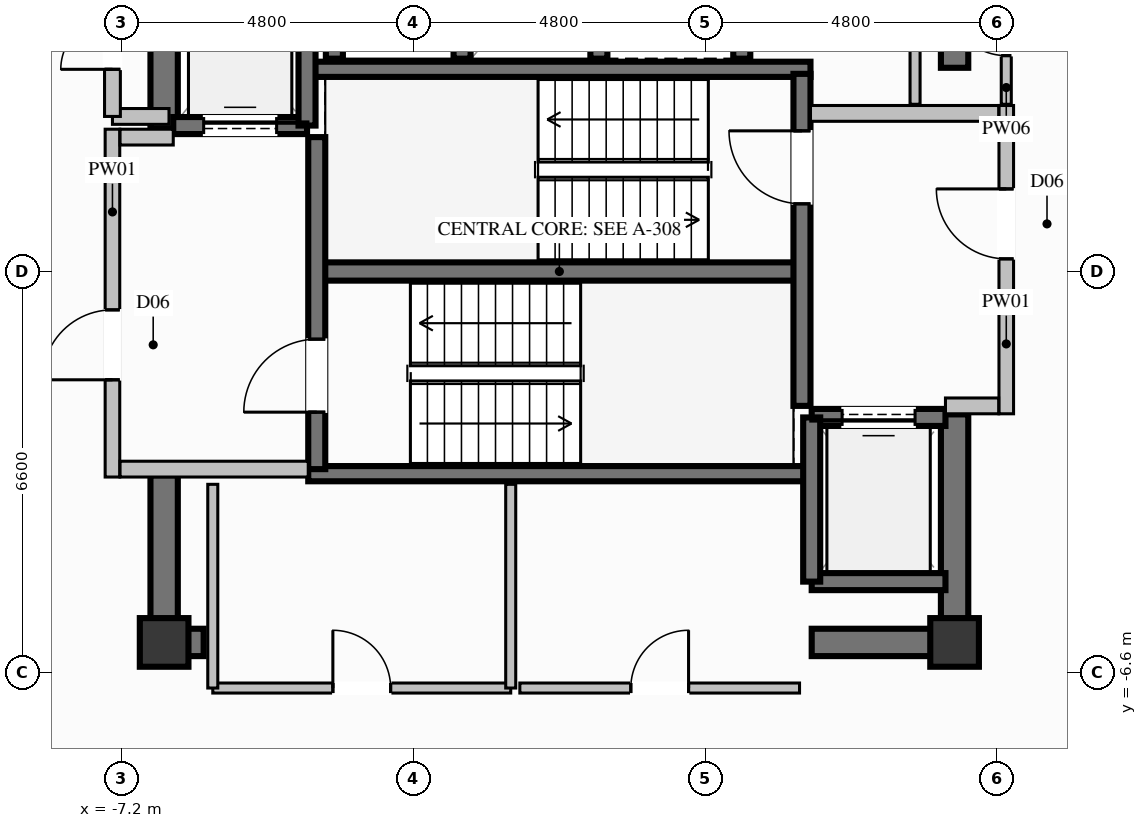
"""IFC4 building model, lengths in metres.
Left out: names, types, materials, properties, quantities, classifications, styles, units other than length and angle.
Written with IfcOpenShell. Run it as: python <this file> out.ifc"""

import sys

from ifc_helpers import new_model, si_unit, direction, frame, frame_2d, origin, origin_2d, place, context, subcontext, project, spatial, rectangle, extrude, element, fill, save


model = new_model("IFC4")
c1 = context("Model", 3, precision=1e-05, world=origin(), true_north=direction((0.0, 1.0)))
c2 = subcontext(c1, "Body", "Model", "MODEL_VIEW")
j1 = project(units=[si_unit("LENGTHUNIT", "METRE"), si_unit("PLANEANGLEUNIT", "RADIAN")], contexts=[c1])
p1 = place(None, origin())
s1 = spatial("IfcSite", under=j1, at=p1, CompositionType="ELEMENT")
p2 = place(p1, origin())
s2 = spatial("IfcBuilding", under=s1, at=p2, CompositionType="ELEMENT")
p3 = place(p2, frame((0.0, 0.0, 285.8)))
s3 = spatial("IfcBuildingStorey", under=s2, at=p3, CompositionType="ELEMENT", Elevation=285.8)
for number, where, z_axis, x_axis in (
    (1, (-6.5, -6.1, 0.0), (0.0, 0.0, 1.0), (1.0, 0.0, 0.0)),
    (2, (6.5, -6.1, 0.0), (0.0, 0.0, 1.0), (1.0, 0.0, 0.0)),
):
    element("IfcColumn", number, at=place(p3, frame(where, z_axis=z_axis, x_axis=x_axis)), inside=s3, PredefinedType="COLUMN", context=c2, shape_type="SweptSolid", body=[
        extrude(rectangle(XDim=0.8, YDim=0.8, at=origin_2d()), origin(), (0.0, 0.0, 1.0), 3.8),
    ])
p4 = place(p3, frame((-3.99, 0.0, 0.0), z_axis=(0.0, 0.0, 1.0), x_axis=(1.0, 0.0, 0.0)))
e3 = element("IfcWall", 3, at=p4, inside=s3, PredefinedType="SHEAR", context=c2, shape_type="SweptSolid", body=[
    extrude(rectangle(XDim=7.98, YDim=0.3, at=frame_2d((3.99, 0.0))), origin(), (0.0, 0.0, 1.0), 3.8),
])
for number, where, z_axis, x_axis in (
    (4, (-4.13, -3.325, 0.0), (0.0, 0.0, 1.0), (1.0, 0.0, 0.0)),
    (5, (-4.13, 3.325, 0.0), (0.0, 0.0, 1.0), (1.0, 0.0, 0.0)),
):
    element("IfcWall", number, at=place(p3, frame(where, z_axis=z_axis, x_axis=x_axis)), inside=s3, PredefinedType="SOLIDWALL", context=c2, shape_type="SweptSolid", body=[
        extrude(rectangle(XDim=8.26, YDim=0.25, at=frame_2d((4.13, 0.0))), origin(), (0.0, 0.0, 1.0), 3.8),
    ])
p5 = place(p3, frame((-6.275, -6.1, 0.0), z_axis=(0.0, 0.0, 1.0), x_axis=(1.0, 0.0, 0.0)))
e6 = element("IfcWall", 6, at=p5, inside=s3, PredefinedType="SHEAR", context=c2, shape_type="SweptSolid", body=[
    extrude(rectangle(XDim=0.425, YDim=0.45, at=frame_2d((0.212, 0.0))), origin(), (0.0, 0.0, 1.0), 3.8),
])
p6 = place(p3, frame((4.15, -6.1, 0.0), z_axis=(0.0, 0.0, 1.0), x_axis=(1.0, 0.0, 0.0)))
e7 = element("IfcWall", 7, at=p6, inside=s3, PredefinedType="SHEAR", context=c2, shape_type="SweptSolid", body=[
    extrude(rectangle(XDim=2.125, YDim=0.45, at=frame_2d((1.062, 0.0))), origin(), (0.0, 0.0, 1.0), 3.8),
])
p7 = place(p3, frame((-6.5, 2.35, 0.0), z_axis=(0.0, 0.0, 1.0), x_axis=(0.0, 1.0, 0.0)))
e8 = element("IfcWall", 8, at=p7, inside=s3, PredefinedType="SHEAR", context=c2, shape_type="SweptSolid", body=[
    extrude(rectangle(XDim=3.975, YDim=0.45, at=frame_2d((1.987, 0.0))), origin(), (0.0, 0.0, 1.0), 3.8),
])
p8 = place(p3, frame((-6.5, -6.325, 0.0), z_axis=(0.0, 0.0, 1.0), x_axis=(0.0, 1.0, 0.0)))
e9 = element("IfcWall", 9, at=p8, inside=s3, PredefinedType="SHEAR", context=c2, shape_type="SweptSolid", body=[
    extrude(rectangle(XDim=2.975, YDim=0.45, at=frame_2d((1.487, 0.0))), origin(), (0.0, 0.0, 1.0), 3.8),
])
p9 = place(p3, frame((6.5, -6.325, 0.0), z_axis=(0.0, 0.0, 1.0), x_axis=(0.0, 1.0, 0.0)))
e10 = element("IfcWall", 10, at=p9, inside=s3, PredefinedType="SHEAR", context=c2, shape_type="SweptSolid", body=[
    extrude(rectangle(XDim=3.975, YDim=0.45, at=frame_2d((1.987, 0.0))), origin(), (0.0, 0.0, 1.0), 3.8),
])
p10 = place(p3, frame((6.5, 3.35, 0.0), z_axis=(0.0, 0.0, 1.0), x_axis=(0.0, 1.0, 0.0)))
e11 = element("IfcWall", 11, at=p10, inside=s3, PredefinedType="SHEAR", context=c2, shape_type="SweptSolid", body=[
    extrude(rectangle(XDim=2.975, YDim=0.45, at=frame_2d((1.487, 0.0))), origin(), (0.0, 0.0, 1.0), 3.8),
])
for number, where, z_axis, x_axis in (
    (12, (-3.7, 6.0, 0.0), (0.0, 0.0, 1.0), (0.0, -1.0, 0.0)),
    (13, (-1.6, 3.5, 0.0), (0.0, 0.0, 1.0), (0.0, 1.0, 0.0)),
    (14, (0.65, 3.5, 0.0), (0.0, 0.0, 1.0), (0.0, 1.0, 0.0)),
    (15, (3.0, 3.5, 0.0), (0.0, 0.0, 1.0), (0.0, 1.0, 0.0)),
):
    element("IfcWall", number, at=place(p3, frame(where, z_axis=z_axis, x_axis=x_axis)), inside=s3, PredefinedType="SOLIDWALL", context=c2, shape_type="SweptSolid", body=[
        extrude(rectangle(XDim=2.5, YDim=0.28, at=frame_2d((1.25, 0.0))), origin(), (0.0, 0.0, 1.0), 3.57),
    ])
p11 = place(p3, frame((-6.35, 2.4, 0.0), z_axis=(0.0, 0.0, 1.0), x_axis=(1.0, 0.0, 0.0)))
e16 = element("IfcWall", 16, at=p11, inside=s3, PredefinedType="SOLIDWALL", context=c2, shape_type="SweptSolid", body=[
    extrude(rectangle(XDim=2.2, YDim=0.28, at=frame_2d((1.1, 0.0))), origin(), (0.0, 0.0, 1.0), 3.57),
])
p12 = place(p11, frame((0.5, 0.0, 0.0)))
e17 = element("IfcOpeningElement", 17, at=p12, cuts=e16, PredefinedType="OPENING", context=c2, shape_type="SweptSolid", body=[
    extrude(rectangle(XDim=1.2, YDim=2.2, at=frame_2d((0.6, 1.1))), frame((0.0, 0.15, 0.0), z_axis=(0.0, -1.0, 0.0), x_axis=(1.0, 0.0, 0.0)), (0.0, 0.0, 1.0), 0.3),
])
p13 = place(p3, frame((-4.15, 2.4, 0.0), z_axis=(0.0, 0.0, 1.0), x_axis=(0.0, 1.0, 0.0)))
e18 = element("IfcWall", 18, at=p13, inside=s3, PredefinedType="SOLIDWALL", context=c2, shape_type="SweptSolid", body=[
    extrude(rectangle(XDim=2.7, YDim=0.28, at=frame_2d((1.35, 0.0))), origin(), (0.0, 0.0, 1.0), 3.57),
])
p14 = place(p3, frame((4.15, -5.1, 0.0), z_axis=(0.0, 0.0, 1.0), x_axis=(1.0, 0.0, 0.0)))
e19 = element("IfcWall", 19, at=p14, inside=s3, PredefinedType="SOLIDWALL", context=c2, shape_type="SweptSolid", body=[
    extrude(rectangle(XDim=2.2, YDim=0.28, at=frame_2d((1.1, 0.0))), origin(), (0.0, 0.0, 1.0), 3.57),
])
p15 = place(p3, frame((6.35, -2.4, 0.0), z_axis=(0.0, 0.0, 1.0), x_axis=(-1.0, 0.0, 0.0)))
e20 = element("IfcWall", 20, at=p15, inside=s3, PredefinedType="SOLIDWALL", context=c2, shape_type="SweptSolid", body=[
    extrude(rectangle(XDim=2.2, YDim=0.28, at=frame_2d((1.1, 0.0))), origin(), (0.0, 0.0, 1.0), 3.57),
])
p16 = place(p15, frame((0.5, 0.0, 0.0)))
e21 = element("IfcOpeningElement", 21, at=p16, cuts=e20, PredefinedType="OPENING", context=c2, shape_type="SweptSolid", body=[
    extrude(rectangle(XDim=1.2, YDim=2.2, at=frame_2d((0.6, 1.1))), frame((0.0, 0.15, 0.0), z_axis=(0.0, -1.0, 0.0), x_axis=(1.0, 0.0, 0.0)), (0.0, 0.0, 1.0), 0.3),
])
p17 = place(p3, frame((4.15, -2.4, 0.0), z_axis=(0.0, 0.0, 1.0), x_axis=(0.0, -1.0, 0.0)))
e22 = element("IfcWall", 22, at=p17, inside=s3, PredefinedType="SOLIDWALL", context=c2, shape_type="SweptSolid", body=[
    extrude(rectangle(XDim=2.7, YDim=0.28, at=frame_2d((1.35, 0.0))), origin(), (0.0, 0.0, 1.0), 3.57),
])
p18 = place(p3, frame((-3.99, -3.25, 0.0), z_axis=(0.0, 0.0, 1.0), x_axis=(0.0, 1.0, 0.0)))
e23 = element("IfcWall", 23, at=p18, inside=s3, PredefinedType="SOLIDWALL", context=c2, shape_type="SweptSolid", body=[
    extrude(rectangle(XDim=5.46, YDim=0.28, at=frame_2d((2.73, 0.0))), origin(), (0.0, 0.0, 1.0), 3.57),
])
p19 = place(p18, frame((0.937, 0.0, 0.0)))
e24 = element("IfcOpeningElement", 24, at=p19, cuts=e23, PredefinedType="OPENING", context=c2, shape_type="SweptSolid", body=[
    extrude(rectangle(XDim=1.2, YDim=2.2, at=frame_2d((0.6, 1.1))), frame((0.0, 0.15, 0.0), z_axis=(0.0, -1.0, 0.0), x_axis=(1.0, 0.0, 0.0)), (0.0, 0.0, 1.0), 0.3),
])
p20 = place(p3, frame((3.99, -2.21, 0.0), z_axis=(0.0, 0.0, 1.0), x_axis=(0.0, 1.0, 0.0)))
e25 = element("IfcWall", 25, at=p20, inside=s3, PredefinedType="SOLIDWALL", context=c2, shape_type="SweptSolid", body=[
    extrude(rectangle(XDim=5.46, YDim=0.28, at=frame_2d((2.73, 0.0))), origin(), (0.0, 0.0, 1.0), 3.57),
])
p21 = place(p20, frame((3.323, 0.0, 0.0)))
e26 = element("IfcOpeningElement", 26, at=p21, cuts=e25, PredefinedType="OPENING", context=c2, shape_type="SweptSolid", body=[
    extrude(rectangle(XDim=1.2, YDim=2.2, at=frame_2d((0.6, 1.1))), frame((0.0, 0.15, 0.0), z_axis=(0.0, -1.0, 0.0), x_axis=(1.0, 0.0, 0.0)), (0.0, 0.0, 1.0), 0.3),
])
p22 = place(p3, frame((-7.35, -3.38, 0.0), z_axis=(0.0, 0.0, 1.0), x_axis=(0.0, 1.0, 0.0)))
e27 = element("IfcWall", 27, at=p22, inside=s3, PredefinedType="PARTITIONING", context=c2, shape_type="SweptSolid", body=[
    extrude(rectangle(XDim=5.72, YDim=0.24, at=frame_2d((2.86, 0.0))), origin(), (0.0, 0.0, 1.0), 2.655),
])
p23 = place(p22, frame((1.599, 0.0, 0.0)))
e28 = element("IfcOpeningElement", 28, at=p23, cuts=e27, PredefinedType="OPENING", context=c2, shape_type="SweptSolid", body=[
    extrude(rectangle(XDim=1.15, YDim=2.2, at=frame_2d((0.575, 1.1))), frame((0.0, 0.13, 0.0), z_axis=(0.0, -1.0, 0.0), x_axis=(1.0, 0.0, 0.0)), (0.0, 0.0, 1.0), 0.26),
])
p24 = place(p3, frame((-7.225, -3.25, 0.0), z_axis=(0.0, 0.0, 1.0), x_axis=(1.0, 0.0, 0.0)))
e29 = element("IfcWall", 29, at=p24, inside=s3, PredefinedType="PARTITIONING", context=c2, shape_type="SweptSolid", body=[
    extrude(rectangle(XDim=3.095, YDim=0.26, at=frame_2d((1.548, 0.0))), origin(), (0.0, 0.0, 1.0), 3.57),
])
p25 = place(p3, frame((-7.225, 2.21, 0.0), z_axis=(0.0, 0.0, 1.0), x_axis=(1.0, 0.0, 0.0)))
e30 = element("IfcWall", 30, at=p25, inside=s3, PredefinedType="PARTITIONING", context=c2, shape_type="SweptSolid", body=[
    extrude(rectangle(XDim=0.875, YDim=0.26, at=frame_2d((0.438, 0.0))), origin(), (0.0, 0.0, 1.0), 3.57),
])
p26 = place(p3, frame((7.35, -2.34, 0.0), z_axis=(0.0, 0.0, 1.0), x_axis=(0.0, 1.0, 0.0)))
e31 = element("IfcWall", 31, at=p26, inside=s3, PredefinedType="PARTITIONING", context=c2, shape_type="SweptSolid", body=[
    extrude(rectangle(XDim=5.07, YDim=0.24, at=frame_2d((2.535, 0.0))), origin(), (0.0, 0.0, 1.0), 2.655),
])
p27 = place(p26, frame((2.548, 0.0, 0.0)))
e32 = element("IfcOpeningElement", 32, at=p27, cuts=e31, PredefinedType="OPENING", context=c2, shape_type="SweptSolid", body=[
    extrude(rectangle(XDim=1.15, YDim=2.2, at=frame_2d((0.575, 1.1))), frame((0.0, 0.13, 0.0), z_axis=(0.0, -1.0, 0.0), x_axis=(1.0, 0.0, 0.0)), (0.0, 0.0, 1.0), 0.26),
])
p28 = place(p3, frame((6.35, -2.21, 0.0), z_axis=(0.0, 0.0, 1.0), x_axis=(1.0, 0.0, 0.0)))
e33 = element("IfcWall", 33, at=p28, inside=s3, PredefinedType="PARTITIONING", context=c2, shape_type="SweptSolid", body=[
    extrude(rectangle(XDim=0.875, YDim=0.26, at=frame_2d((0.438, 0.0))), origin(), (0.0, 0.0, 1.0), 3.57),
])
p29 = place(p3, frame((4.13, 2.6, 0.0), z_axis=(0.0, 0.0, 1.0), x_axis=(1.0, 0.0, 0.0)))
e34 = element("IfcWall", 34, at=p29, inside=s3, PredefinedType="PARTITIONING", context=c2, shape_type="SweptSolid", body=[
    extrude(rectangle(XDim=3.095, YDim=0.26, at=frame_2d((1.548, 0.0))), origin(), (0.0, 0.0, 1.0), 3.57),
])
p30 = place(p3, frame((-7.35, 2.55, 0.0), z_axis=(0.0, 0.0, 1.0), x_axis=(1.0, 0.0, 0.0)))
e35 = element("IfcWall", 35, at=p30, inside=s3, PredefinedType="PARTITIONING", context=c2, shape_type="SweptSolid", body=[
    extrude(rectangle(XDim=0.93, YDim=0.26, at=frame_2d((0.465, 0.0))), origin(), (0.0, 0.0, 1.0), 3.57),
])
p31 = place(p3, frame((-7.35, 2.55, 0.0), z_axis=(0.0, 0.0, 1.0), x_axis=(0.0, 1.0, 0.0)))
e36 = element("IfcWall", 36, at=p31, inside=s3, PredefinedType="PARTITIONING", context=c2, shape_type="SweptSolid", body=[
    extrude(rectangle(XDim=2.4, YDim=0.26, at=frame_2d((1.2, 0.0))), origin(), (0.0, 0.0, 1.0), 2.655),
])
p32 = place(p31, frame((0.775, 0.0, 0.0)))
e37 = element("IfcOpeningElement", 37, at=p32, cuts=e36, PredefinedType="OPENING", context=c2, shape_type="SweptSolid", body=[
    extrude(rectangle(XDim=0.85, YDim=2.05, at=frame_2d((0.425, 1.025))), frame((0.0, 0.14, 0.0), z_axis=(0.0, -1.0, 0.0), x_axis=(1.0, 0.0, 0.0)), (0.0, 0.0, 1.0), 0.28),
])
p33 = place(p3, frame((7.35, 2.75, 0.0), z_axis=(0.0, 0.0, 1.0), x_axis=(0.0, 1.0, 0.0)))
e38 = element("IfcWall", 38, at=p33, inside=s3, PredefinedType="PARTITIONING", context=c2, shape_type="SweptSolid", body=[
    extrude(rectangle(XDim=2.55, YDim=0.165, at=frame_2d((1.275, 0.0))), origin(), (0.0, 0.0, 1.0), 3.57),
])
p34 = place(p33, frame((0.8, 0.0, 0.0)))
e39 = element("IfcOpeningElement", 39, at=p34, cuts=e38, PredefinedType="OPENING", context=c2, shape_type="SweptSolid", body=[
    extrude(rectangle(XDim=0.95, YDim=2.1, at=frame_2d((0.475, 1.05))), frame((0.0, 0.093, 0.0), z_axis=(0.0, -1.0, 0.0), x_axis=(1.0, 0.0, 0.0)), (0.0, 0.0, 1.0), 0.185),
])
p35 = place(p3, frame((5.85, 5.3, 0.0), z_axis=(0.0, 0.0, 1.0), x_axis=(0.0, -1.0, 0.0)))
e40 = element("IfcWall", 40, at=p35, inside=s3, PredefinedType="PARTITIONING", context=c2, shape_type="SweptSolid", body=[
    extrude(rectangle(XDim=2.55, YDim=0.165, at=frame_2d((1.275, 0.0))), origin(), (0.0, 0.0, 1.0), 2.655),
])
p36 = place(p3, frame((-5.7, -6.85, 0.0), z_axis=(0.0, 0.0, 1.0), x_axis=(1.0, 0.0, 0.0)))
e41 = element("IfcWall", 41, at=p36, inside=s3, PredefinedType="PARTITIONING", context=c2, shape_type="SweptSolid", body=[
    extrude(rectangle(XDim=4.9, YDim=0.165, at=frame_2d((2.45, 0.0))), origin(), (0.0, 0.0, 1.0), 2.655),
])
p37 = place(p36, frame((1.975, 0.0, 0.0)))
e42 = element("IfcOpeningElement", 42, at=p37, cuts=e41, PredefinedType="OPENING", context=c2, shape_type="SweptSolid", body=[
    extrude(rectangle(XDim=0.95, YDim=2.1, at=frame_2d((0.475, 1.05))), frame((0.0, 0.093, 0.0), z_axis=(0.0, -1.0, 0.0), x_axis=(1.0, 0.0, 0.0)), (0.0, 0.0, 1.0), 0.185),
])
p38 = place(p3, frame((-0.8, -6.85, 0.0), z_axis=(0.0, 0.0, 1.0), x_axis=(0.0, 1.0, 0.0)))
e43 = element("IfcWall", 43, at=p38, inside=s3, PredefinedType="PARTITIONING", context=c2, shape_type="SweptSolid", body=[
    extrude(rectangle(XDim=3.35, YDim=0.165, at=frame_2d((1.675, 0.0))), origin(), (0.0, 0.0, 1.0), 3.57),
])
p39 = place(p3, frame((-5.7, -3.5, 0.0), z_axis=(0.0, 0.0, 1.0), x_axis=(0.0, -1.0, 0.0)))
e44 = element("IfcWall", 44, at=p39, inside=s3, PredefinedType="PARTITIONING", context=c2, shape_type="SweptSolid", body=[
    extrude(rectangle(XDim=3.35, YDim=0.165, at=frame_2d((1.675, 0.0))), origin(), (0.0, 0.0, 1.0), 2.655),
])
p40 = place(p3, frame((-0.65, -6.85, 0.0), z_axis=(0.0, 0.0, 1.0), x_axis=(1.0, 0.0, 0.0)))
e45 = element("IfcWall", 45, at=p40, inside=s3, PredefinedType="PARTITIONING", context=c2, shape_type="SweptSolid", body=[
    extrude(rectangle(XDim=4.6, YDim=0.165, at=frame_2d((2.3, 0.0))), origin(), (0.0, 0.0, 1.0), 2.655),
])
p41 = place(p40, frame((1.825, 0.0, 0.0)))
e46 = element("IfcOpeningElement", 46, at=p41, cuts=e45, PredefinedType="OPENING", context=c2, shape_type="SweptSolid", body=[
    extrude(rectangle(XDim=0.95, YDim=2.1, at=frame_2d((0.475, 1.05))), frame((0.0, 0.093, 0.0), z_axis=(0.0, -1.0, 0.0), x_axis=(1.0, 0.0, 0.0)), (0.0, 0.0, 1.0), 0.185),
])
p42 = place(p12, origin())
e47 = element("IfcDoor", 47, at=p42, inside=s3, OperationType="SLIDING_TO_LEFT", PredefinedType="DOOR", context=c2, shape_type="SweptSolid", body=[
    extrude(rectangle(XDim=1.2, YDim=2.2, at=frame_2d((0.6, 1.1))), frame((0.0, 0.025, 0.0), z_axis=(0.0, -1.0, 0.0), x_axis=(1.0, 0.0, 0.0)), (0.0, 0.0, 1.0), 0.05),
])
fill(e17, e47)
p43 = place(p16, origin())
e48 = element("IfcDoor", 48, at=p43, inside=s3, OperationType="SLIDING_TO_LEFT", PredefinedType="DOOR", context=c2, shape_type="SweptSolid", body=[
    extrude(rectangle(XDim=1.2, YDim=2.2, at=frame_2d((0.6, 1.1))), frame((0.0, 0.025, 0.0), z_axis=(0.0, -1.0, 0.0), x_axis=(1.0, 0.0, 0.0)), (0.0, 0.0, 1.0), 0.05),
])
fill(e21, e48)
p44 = place(p19, origin())
e49 = element("IfcDoor", 49, at=p44, inside=s3, OperationType="SINGLE_SWING_LEFT", PredefinedType="DOOR", context=c2, shape_type="SweptSolid", body=[
    extrude(rectangle(XDim=1.2, YDim=2.2, at=frame_2d((0.6, 1.1))), frame((0.0, 0.025, 0.0), z_axis=(0.0, -1.0, 0.0), x_axis=(1.0, 0.0, 0.0)), (0.0, 0.0, 1.0), 0.05),
])
fill(e24, e49)
p45 = place(p21, origin())
e50 = element("IfcDoor", 50, at=p45, inside=s3, OperationType="SINGLE_SWING_RIGHT", PredefinedType="DOOR", context=c2, shape_type="SweptSolid", body=[
    extrude(rectangle(XDim=1.2, YDim=2.2, at=frame_2d((0.6, 1.1))), frame((0.0, 0.025, 0.0), z_axis=(0.0, -1.0, 0.0), x_axis=(1.0, 0.0, 0.0)), (0.0, 0.0, 1.0), 0.05),
])
fill(e26, e50)
p46 = place(p23, origin())
e51 = element("IfcDoor", 51, at=p46, inside=s3, OperationType="SINGLE_SWING_LEFT", PredefinedType="DOOR", context=c2, shape_type="SweptSolid", body=[
    extrude(rectangle(XDim=1.15, YDim=2.2, at=frame_2d((0.575, 1.1))), frame((0.0, 0.025, 0.0), z_axis=(0.0, -1.0, 0.0), x_axis=(1.0, 0.0, 0.0)), (0.0, 0.0, 1.0), 0.05),
])
fill(e28, e51)
p47 = place(p27, origin())
e52 = element("IfcDoor", 52, at=p47, inside=s3, OperationType="SINGLE_SWING_RIGHT", PredefinedType="DOOR", context=c2, shape_type="SweptSolid", body=[
    extrude(rectangle(XDim=1.15, YDim=2.2, at=frame_2d((0.575, 1.1))), frame((0.0, 0.025, 0.0), z_axis=(0.0, -1.0, 0.0), x_axis=(1.0, 0.0, 0.0)), (0.0, 0.0, 1.0), 0.05),
])
fill(e32, e52)
p48 = place(p32, origin())
e53 = element("IfcDoor", 53, at=p48, inside=s3, OperationType="SINGLE_SWING_LEFT", PredefinedType="DOOR", context=c2, shape_type="SweptSolid", body=[
    extrude(rectangle(XDim=0.85, YDim=2.05, at=frame_2d((0.425, 1.025))), frame((0.0, 0.025, 0.0), z_axis=(0.0, -1.0, 0.0), x_axis=(1.0, 0.0, 0.0)), (0.0, 0.0, 1.0), 0.05),
])
fill(e37, e53)
p49 = place(p34, origin())
e54 = element("IfcDoor", 54, at=p49, inside=s3, OperationType="SINGLE_SWING_RIGHT", PredefinedType="DOOR", context=c2, shape_type="SweptSolid", body=[
    extrude(rectangle(XDim=0.95, YDim=2.1, at=frame_2d((0.475, 1.05))), frame((0.0, 0.025, 0.0), z_axis=(0.0, -1.0, 0.0), x_axis=(1.0, 0.0, 0.0)), (0.0, 0.0, 1.0), 0.05),
])
fill(e39, e54)
p50 = place(p37, origin())
e55 = element("IfcDoor", 55, at=p50, inside=s3, OperationType="SINGLE_SWING_LEFT", PredefinedType="DOOR", context=c2, shape_type="SweptSolid", body=[
    extrude(rectangle(XDim=0.95, YDim=2.1, at=frame_2d((0.475, 1.05))), frame((0.0, 0.025, 0.0), z_axis=(0.0, -1.0, 0.0), x_axis=(1.0, 0.0, 0.0)), (0.0, 0.0, 1.0), 0.05),
])
fill(e42, e55)
p51 = place(p41, origin())
e56 = element("IfcDoor", 56, at=p51, inside=s3, OperationType="SINGLE_SWING_RIGHT", PredefinedType="DOOR", context=c2, shape_type="SweptSolid", body=[
    extrude(rectangle(XDim=0.95, YDim=2.1, at=frame_2d((0.475, 1.05))), frame((0.0, 0.025, 0.0), z_axis=(0.0, -1.0, 0.0), x_axis=(1.0, 0.0, 0.0)), (0.0, 0.0, 1.0), 0.05),
])
fill(e46, e56)
save(model, sys.argv[1])
